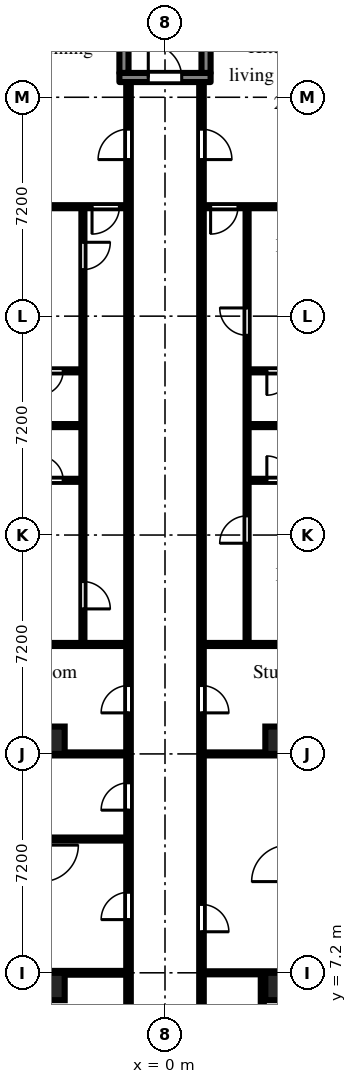
"""IFC4 building model, lengths in metres.
Left out: names, types, materials, properties, quantities, classifications, styles, units other than length and angle.
Written with IfcOpenShell. Run it as: python <this file> out.ifc"""

import sys

from ifc_helpers import new_model, si_unit, direction, frame, frame_2d, origin, origin_2d, place, context, subcontext, project, spatial, rectangle, extrude, element, fill, save


model = new_model("IFC4")
c1 = context("Model", 3, precision=1e-05, world=origin(), true_north=direction((0.0, 1.0)))
c2 = subcontext(c1, "Body", "Model", "MODEL_VIEW")
j1 = project(units=[si_unit("LENGTHUNIT", "METRE"), si_unit("PLANEANGLEUNIT", "RADIAN")], contexts=[c1])
p1 = place(None, origin())
s1 = spatial("IfcSite", under=j1, at=p1, CompositionType="ELEMENT")
p2 = place(p1, origin())
s2 = spatial("IfcBuilding", under=s1, at=p2, CompositionType="ELEMENT")
p3 = place(p2, frame((0.0, 0.0, 20.7)))
s3 = spatial("IfcBuildingStorey", under=s2, at=p3, CompositionType="ELEMENT", Elevation=20.7)
for number, where, z_axis, x_axis in (
    (1, (-3.75, 6.75, 0.0), (0.0, 0.0, 1.0), (1.0, 0.0, 0.0)),
    (2, (-3.75, 14.85, 0.0), (0.0, 0.0, 1.0), (1.0, 0.0, 0.0)),
    (3, (3.75, 6.75, 0.0), (0.0, 0.0, 1.0), (1.0, 0.0, 0.0)),
    (4, (3.75, 14.85, 0.0), (0.0, 0.0, 1.0), (1.0, 0.0, 0.0)),
):
    element("IfcColumn", number, at=place(p3, frame(where, z_axis=z_axis, x_axis=x_axis)), inside=s3, PredefinedType="COLUMN", context=c2, shape_type="SweptSolid", body=[
        extrude(rectangle(XDim=0.9, YDim=0.9, at=origin_2d()), origin(), (0.0, 0.0, 1.0), 3.0),
    ])
p4 = place(p3, frame((-1.5, 36.65, 0.0), z_axis=(0.0, 0.0, 1.0), x_axis=(1.0, 0.0, 0.0)))
e5 = element("IfcWall", 5, at=p4, inside=s3, PredefinedType="SHEAR", context=c2, shape_type="SweptSolid", body=[
    extrude(rectangle(XDim=3.0, YDim=0.3, at=frame_2d((1.5, 0.0))), origin(), (0.0, 0.0, 1.0), 2.575),
])
p5 = place(p4, frame((0.95, 0.0, 0.0)))
e6 = element("IfcOpeningElement", 6, at=p5, cuts=e5, PredefinedType="OPENING", context=c2, shape_type="SweptSolid", body=[
    extrude(rectangle(XDim=1.1, YDim=2.1, at=frame_2d((0.55, 1.05))), frame((0.0, 0.16, 0.0), z_axis=(0.0, -1.0, 0.0), x_axis=(1.0, 0.0, 0.0)), (0.0, 0.0, 1.0), 0.32),
])
for number, where, z_axis, x_axis in (
    (7, (-1.35, 36.8, 0.0), (0.0, 0.0, 1.0), (0.0, 1.0, 0.0)),
    (8, (1.35, 36.8, 0.0), (0.0, 0.0, 1.0), (0.0, 1.0, 0.0)),
):
    element("IfcWall", number, at=place(p3, frame(where, z_axis=z_axis, x_axis=x_axis)), inside=s3, PredefinedType="SHEAR", context=c2, shape_type="SweptSolid", body=[
        extrude(rectangle(XDim=5.8, YDim=0.3, at=frame_2d((2.9, 0.0))), origin(), (0.0, 0.0, 1.0), 2.575),
    ])
p6 = place(p3, frame((-6.9, 18.0, 0.0), z_axis=(0.0, 0.0, 1.0), x_axis=(1.0, 0.0, 0.0)))
e9 = element("IfcWall", 9, at=p6, inside=s3, PredefinedType="PARTITIONING", context=c2, shape_type="SweptSolid", body=[
    extrude(rectangle(XDim=5.625, YDim=0.1, at=frame_2d((2.812, 0.0))), origin(), (0.0, 0.0, 1.0), 2.575),
])
p7 = place(p3, frame((-6.9, 25.2, 0.0), z_axis=(0.0, 0.0, 1.0), x_axis=(1.0, 0.0, 0.0)))
e10 = element("IfcWall", 10, at=p7, inside=s3, PredefinedType="PARTITIONING", context=c2, shape_type="SweptSolid", body=[
    extrude(rectangle(XDim=4.15, YDim=0.1, at=frame_2d((2.075, 0.0))), origin(), (0.0, 0.0, 1.0), 2.575),
])
p8 = place(p3, frame((-6.9, 32.4, 0.0), z_axis=(0.0, 0.0, 1.0), x_axis=(1.0, 0.0, 0.0)))
e11 = element("IfcWall", 11, at=p8, inside=s3, PredefinedType="PARTITIONING", context=c2, shape_type="SweptSolid", body=[
    extrude(rectangle(XDim=5.625, YDim=0.1, at=frame_2d((2.812, 0.0))), origin(), (0.0, 0.0, 1.0), 2.575),
])
p9 = place(p8, frame((4.5, 0.0, 0.0)))
e12 = element("IfcOpeningElement", 12, at=p9, cuts=e11, PredefinedType="OPENING", context=c2, shape_type="SweptSolid", body=[
    extrude(rectangle(XDim=0.9, YDim=2.1, at=frame_2d((0.45, 1.05))), frame((0.0, 0.06, 0.0), z_axis=(0.0, -1.0, 0.0), x_axis=(1.0, 0.0, 0.0)), (0.0, 0.0, 1.0), 0.12),
])
p10 = place(p3, frame((-4.75, 23.4, 0.0), z_axis=(0.0, 0.0, 1.0), x_axis=(1.0, 0.0, 0.0)))
e13 = element("IfcWall", 13, at=p10, inside=s3, PredefinedType="PARTITIONING", context=c2, shape_type="SweptSolid", body=[
    extrude(rectangle(XDim=2.0, YDim=0.1, at=frame_2d((1.0, 0.0))), origin(), (0.0, 0.0, 1.0), 2.575),
])
p11 = place(p10, frame((0.6, 0.0, 0.0)))
e14 = element("IfcOpeningElement", 14, at=p11, cuts=e13, PredefinedType="OPENING", context=c2, shape_type="SweptSolid", body=[
    extrude(rectangle(XDim=0.8, YDim=2.1, at=frame_2d((0.4, 1.05))), frame((0.0, 0.06, 0.0), z_axis=(0.0, -1.0, 0.0), x_axis=(1.0, 0.0, 0.0)), (0.0, 0.0, 1.0), 0.12),
])
p12 = place(p3, frame((-4.75, 27.0, 0.0), z_axis=(0.0, 0.0, 1.0), x_axis=(1.0, 0.0, 0.0)))
e15 = element("IfcWall", 15, at=p12, inside=s3, PredefinedType="PARTITIONING", context=c2, shape_type="SweptSolid", body=[
    extrude(rectangle(XDim=2.0, YDim=0.1, at=frame_2d((1.0, 0.0))), origin(), (0.0, 0.0, 1.0), 2.575),
])
p13 = place(p12, frame((0.6, 0.0, 0.0)))
e16 = element("IfcOpeningElement", 16, at=p13, cuts=e15, PredefinedType="OPENING", context=c2, shape_type="SweptSolid", body=[
    extrude(rectangle(XDim=0.8, YDim=2.1, at=frame_2d((0.4, 1.05))), frame((0.0, 0.06, 0.0), z_axis=(0.0, -1.0, 0.0), x_axis=(1.0, 0.0, 0.0)), (0.0, 0.0, 1.0), 0.12),
])
p14 = place(p3, frame((-3.9, 7.2, 0.0), z_axis=(0.0, 0.0, 1.0), x_axis=(1.0, 0.0, 0.0)))
e17 = element("IfcWall", 17, at=p14, inside=s3, PredefinedType="PARTITIONING", context=c2, shape_type="SweptSolid", body=[
    extrude(rectangle(XDim=2.625, YDim=0.125, at=frame_2d((1.312, 0.0))), origin(), (0.0, 0.0, 1.0), 2.575),
])
for number, where, z_axis, x_axis in (
    (18, (-3.9, 11.6, 0.0), (0.0, 0.0, 1.0), (1.0, 0.0, 0.0)),
    (19, (-3.9, 14.4, 0.0), (0.0, 0.0, 1.0), (1.0, 0.0, 0.0)),
):
    element("IfcWall", number, at=place(p3, frame(where, z_axis=z_axis, x_axis=x_axis)), inside=s3, PredefinedType="PARTITIONING", context=c2, shape_type="SweptSolid", body=[
        extrude(rectangle(XDim=2.625, YDim=0.1, at=frame_2d((1.312, 0.0))), origin(), (0.0, 0.0, 1.0), 2.575),
    ])
p15 = place(p3, frame((-2.7, 18.05, 0.0), z_axis=(0.0, 0.0, 1.0), x_axis=(0.0, 1.0, 0.0)))
e20 = element("IfcWall", 20, at=p15, inside=s3, PredefinedType="PARTITIONING", context=c2, shape_type="SweptSolid", body=[
    extrude(rectangle(XDim=14.3, YDim=0.1, at=frame_2d((7.15, 0.0))), origin(), (0.0, 0.0, 1.0), 2.575),
])
p16 = place(p15, frame((1.12, 0.0, 0.0)))
e21 = element("IfcOpeningElement", 21, at=p16, cuts=e20, PredefinedType="OPENING", context=c2, shape_type="SweptSolid", body=[
    extrude(rectangle(XDim=0.9, YDim=2.1, at=frame_2d((0.45, 1.05))), frame((0.0, 0.06, 0.0), z_axis=(0.0, -1.0, 0.0), x_axis=(1.0, 0.0, 0.0)), (0.0, 0.0, 1.0), 0.12),
])
p17 = place(p15, frame((12.28, 0.0, 0.0)))
e22 = element("IfcOpeningElement", 22, at=p17, cuts=e20, PredefinedType="OPENING", context=c2, shape_type="SweptSolid", body=[
    extrude(rectangle(XDim=0.9, YDim=2.1, at=frame_2d((0.45, 1.05))), frame((0.0, 0.06, 0.0), z_axis=(0.0, -1.0, 0.0), x_axis=(1.0, 0.0, 0.0)), (0.0, 0.0, 1.0), 0.12),
])
p18 = place(p3, frame((-1.2, 1.275, 0.0), z_axis=(0.0, 0.0, 1.0), x_axis=(0.0, 1.0, 0.0)))
e23 = element("IfcWall", 23, at=p18, inside=s3, PredefinedType="PARTITIONING", context=c2, shape_type="SweptSolid", body=[
    extrude(rectangle(XDim=35.225, YDim=0.15, at=frame_2d((17.613, 0.0))), origin(), (0.0, 0.0, 1.0), 2.575),
])
p19 = place(p18, frame((0.675, 0.0, 0.0)))
e24 = element("IfcOpeningElement", 24, at=p19, cuts=e23, PredefinedType="OPENING", context=c2, shape_type="SweptSolid", body=[
    extrude(rectangle(XDim=0.9, YDim=2.1, at=frame_2d((0.45, 1.05))), frame((0.0, 0.085, 0.0), z_axis=(0.0, -1.0, 0.0), x_axis=(1.0, 0.0, 0.0)), (0.0, 0.0, 1.0), 0.17),
])
p20 = place(p18, frame((3.675, 0.0, 0.0)))
e25 = element("IfcOpeningElement", 25, at=p20, cuts=e23, PredefinedType="OPENING", context=c2, shape_type="SweptSolid", body=[
    extrude(rectangle(XDim=0.9, YDim=2.1, at=frame_2d((0.45, 1.05))), frame((0.0, 0.085, 0.0), z_axis=(0.0, -1.0, 0.0), x_axis=(1.0, 0.0, 0.0)), (0.0, 0.0, 1.0), 0.17),
])
p21 = place(p18, frame((11.275, 0.0, 0.0)))
e26 = element("IfcOpeningElement", 26, at=p21, cuts=e23, PredefinedType="OPENING", context=c2, shape_type="SweptSolid", body=[
    extrude(rectangle(XDim=0.9, YDim=2.1, at=frame_2d((0.45, 1.05))), frame((0.0, 0.085, 0.0), z_axis=(0.0, -1.0, 0.0), x_axis=(1.0, 0.0, 0.0)), (0.0, 0.0, 1.0), 0.17),
])
p22 = place(p18, frame((7.675, 0.0, 0.0)))
e27 = element("IfcOpeningElement", 27, at=p22, cuts=e23, PredefinedType="OPENING", context=c2, shape_type="SweptSolid", body=[
    extrude(rectangle(XDim=0.9, YDim=2.1, at=frame_2d((0.45, 1.05))), frame((0.0, 0.085, 0.0), z_axis=(0.0, -1.0, 0.0), x_axis=(1.0, 0.0, 0.0)), (0.0, 0.0, 1.0), 0.17),
])
p23 = place(p18, frame((14.475, 0.0, 0.0)))
e28 = element("IfcOpeningElement", 28, at=p23, cuts=e23, PredefinedType="OPENING", context=c2, shape_type="SweptSolid", body=[
    extrude(rectangle(XDim=0.9, YDim=2.1, at=frame_2d((0.45, 1.05))), frame((0.0, 0.085, 0.0), z_axis=(0.0, -1.0, 0.0), x_axis=(1.0, 0.0, 0.0)), (0.0, 0.0, 1.0), 0.17),
])
p24 = place(p18, frame((32.675, 0.0, 0.0)))
e29 = element("IfcOpeningElement", 29, at=p24, cuts=e23, PredefinedType="OPENING", context=c2, shape_type="SweptSolid", body=[
    extrude(rectangle(XDim=1.0, YDim=2.1, at=frame_2d((0.5, 1.05))), frame((0.0, 0.085, 0.0), z_axis=(0.0, -1.0, 0.0), x_axis=(1.0, 0.0, 0.0)), (0.0, 0.0, 1.0), 0.17),
])
p25 = place(p3, frame((1.2, 1.125, 0.0), z_axis=(0.0, 0.0, 1.0), x_axis=(0.0, 1.0, 0.0)))
e30 = element("IfcWall", 30, at=p25, inside=s3, PredefinedType="PARTITIONING", context=c2, shape_type="SweptSolid", body=[
    extrude(rectangle(XDim=35.375, YDim=0.15, at=frame_2d((17.688, 0.0))), origin(), (0.0, 0.0, 1.0), 2.575),
])
p26 = place(p25, frame((2.625, 0.0, 0.0)))
e31 = element("IfcOpeningElement", 31, at=p26, cuts=e30, PredefinedType="OPENING", context=c2, shape_type="SweptSolid", body=[
    extrude(rectangle(XDim=0.9, YDim=2.1, at=frame_2d((0.45, 1.05))), frame((0.0, 0.085, 0.0), z_axis=(0.0, -1.0, 0.0), x_axis=(1.0, 0.0, 0.0)), (0.0, 0.0, 1.0), 0.17),
])
p27 = place(p25, frame((7.425, 0.0, 0.0)))
e32 = element("IfcOpeningElement", 32, at=p27, cuts=e30, PredefinedType="OPENING", context=c2, shape_type="SweptSolid", body=[
    extrude(rectangle(XDim=0.9, YDim=2.1, at=frame_2d((0.45, 1.05))), frame((0.0, 0.085, 0.0), z_axis=(0.0, -1.0, 0.0), x_axis=(1.0, 0.0, 0.0)), (0.0, 0.0, 1.0), 0.17),
])
p28 = place(p25, frame((14.625, 0.0, 0.0)))
e33 = element("IfcOpeningElement", 33, at=p28, cuts=e30, PredefinedType="OPENING", context=c2, shape_type="SweptSolid", body=[
    extrude(rectangle(XDim=0.9, YDim=2.1, at=frame_2d((0.45, 1.05))), frame((0.0, 0.085, 0.0), z_axis=(0.0, -1.0, 0.0), x_axis=(1.0, 0.0, 0.0)), (0.0, 0.0, 1.0), 0.17),
])
p29 = place(p25, frame((32.825, 0.0, 0.0)))
e34 = element("IfcOpeningElement", 34, at=p29, cuts=e30, PredefinedType="OPENING", context=c2, shape_type="SweptSolid", body=[
    extrude(rectangle(XDim=1.0, YDim=2.1, at=frame_2d((0.5, 1.05))), frame((0.0, 0.085, 0.0), z_axis=(0.0, -1.0, 0.0), x_axis=(1.0, 0.0, 0.0)), (0.0, 0.0, 1.0), 0.17),
])
for number, where, z_axis, x_axis in (
    (35, (1.275, 7.2, 0.0), (0.0, 0.0, 1.0), (1.0, 0.0, 0.0)),
    (36, (1.275, 14.4, 0.0), (0.0, 0.0, 1.0), (1.0, 0.0, 0.0)),
):
    element("IfcWall", number, at=place(p3, frame(where, z_axis=z_axis, x_axis=x_axis)), inside=s3, PredefinedType="PARTITIONING", context=c2, shape_type="SweptSolid", body=[
        extrude(rectangle(XDim=2.625, YDim=0.1, at=frame_2d((1.312, 0.0))), origin(), (0.0, 0.0, 1.0), 2.575),
    ])
p30 = place(p3, frame((1.275, 18.0, 0.0), z_axis=(0.0, 0.0, 1.0), x_axis=(1.0, 0.0, 0.0)))
e37 = element("IfcWall", 37, at=p30, inside=s3, PredefinedType="PARTITIONING", context=c2, shape_type="SweptSolid", body=[
    extrude(rectangle(XDim=5.625, YDim=0.1, at=frame_2d((2.812, 0.0))), origin(), (0.0, 0.0, 1.0), 2.575),
])
p31 = place(p3, frame((1.275, 32.4, 0.0), z_axis=(0.0, 0.0, 1.0), x_axis=(1.0, 0.0, 0.0)))
e38 = element("IfcWall", 38, at=p31, inside=s3, PredefinedType="PARTITIONING", context=c2, shape_type="SweptSolid", body=[
    extrude(rectangle(XDim=5.625, YDim=0.1, at=frame_2d((2.812, 0.0))), origin(), (0.0, 0.0, 1.0), 2.575),
])
p32 = place(p31, frame((0.225, 0.0, 0.0)))
e39 = element("IfcOpeningElement", 39, at=p32, cuts=e38, PredefinedType="OPENING", context=c2, shape_type="SweptSolid", body=[
    extrude(rectangle(XDim=0.9, YDim=2.1, at=frame_2d((0.45, 1.05))), frame((0.0, 0.06, 0.0), z_axis=(0.0, -1.0, 0.0), x_axis=(1.0, 0.0, 0.0)), (0.0, 0.0, 1.0), 0.12),
])
p33 = place(p3, frame((2.7, 18.05, 0.0), z_axis=(0.0, 0.0, 1.0), x_axis=(0.0, 1.0, 0.0)))
e40 = element("IfcWall", 40, at=p33, inside=s3, PredefinedType="PARTITIONING", context=c2, shape_type="SweptSolid", body=[
    extrude(rectangle(XDim=14.3, YDim=0.1, at=frame_2d((7.15, 0.0))), origin(), (0.0, 0.0, 1.0), 2.575),
])
p34 = place(p33, frame((3.28, 0.0, 0.0)))
e41 = element("IfcOpeningElement", 41, at=p34, cuts=e40, PredefinedType="OPENING", context=c2, shape_type="SweptSolid", body=[
    extrude(rectangle(XDim=0.9, YDim=2.1, at=frame_2d((0.45, 1.05))), frame((0.0, 0.06, 0.0), z_axis=(0.0, -1.0, 0.0), x_axis=(1.0, 0.0, 0.0)), (0.0, 0.0, 1.0), 0.12),
])
p35 = place(p33, frame((10.12, 0.0, 0.0)))
e42 = element("IfcOpeningElement", 42, at=p35, cuts=e40, PredefinedType="OPENING", context=c2, shape_type="SweptSolid", body=[
    extrude(rectangle(XDim=0.9, YDim=2.1, at=frame_2d((0.45, 1.05))), frame((0.0, 0.06, 0.0), z_axis=(0.0, -1.0, 0.0), x_axis=(1.0, 0.0, 0.0)), (0.0, 0.0, 1.0), 0.12),
])
p36 = place(p3, frame((2.75, 23.4, 0.0), z_axis=(0.0, 0.0, 1.0), x_axis=(1.0, 0.0, 0.0)))
e43 = element("IfcWall", 43, at=p36, inside=s3, PredefinedType="PARTITIONING", context=c2, shape_type="SweptSolid", body=[
    extrude(rectangle(XDim=2.1, YDim=0.1, at=frame_2d((1.05, 0.0))), origin(), (0.0, 0.0, 1.0), 2.575),
])
p37 = place(p36, frame((0.6, 0.0, 0.0)))
e44 = element("IfcOpeningElement", 44, at=p37, cuts=e43, PredefinedType="OPENING", context=c2, shape_type="SweptSolid", body=[
    extrude(rectangle(XDim=0.8, YDim=2.1, at=frame_2d((0.4, 1.05))), frame((0.0, 0.06, 0.0), z_axis=(0.0, -1.0, 0.0), x_axis=(1.0, 0.0, 0.0)), (0.0, 0.0, 1.0), 0.12),
])
p38 = place(p3, frame((2.75, 25.2, 0.0), z_axis=(0.0, 0.0, 1.0), x_axis=(1.0, 0.0, 0.0)))
e45 = element("IfcWall", 45, at=p38, inside=s3, PredefinedType="PARTITIONING", context=c2, shape_type="SweptSolid", body=[
    extrude(rectangle(XDim=4.15, YDim=0.1, at=frame_2d((2.075, 0.0))), origin(), (0.0, 0.0, 1.0), 2.575),
])
p39 = place(p3, frame((2.75, 27.0, 0.0), z_axis=(0.0, 0.0, 1.0), x_axis=(1.0, 0.0, 0.0)))
e46 = element("IfcWall", 46, at=p39, inside=s3, PredefinedType="PARTITIONING", context=c2, shape_type="SweptSolid", body=[
    extrude(rectangle(XDim=2.1, YDim=0.1, at=frame_2d((1.05, 0.0))), origin(), (0.0, 0.0, 1.0), 2.575),
])
p40 = place(p39, frame((0.6, 0.0, 0.0)))
e47 = element("IfcOpeningElement", 47, at=p40, cuts=e46, PredefinedType="OPENING", context=c2, shape_type="SweptSolid", body=[
    extrude(rectangle(XDim=0.8, YDim=2.1, at=frame_2d((0.4, 1.05))), frame((0.0, 0.06, 0.0), z_axis=(0.0, -1.0, 0.0), x_axis=(1.0, 0.0, 0.0)), (0.0, 0.0, 1.0), 0.12),
])
p41 = place(p3, frame((3.2, 1.275, 0.0), z_axis=(0.0, 0.0, 1.0), x_axis=(0.0, 1.0, 0.0)))
e48 = element("IfcWall", 48, at=p41, inside=s3, PredefinedType="PARTITIONING", context=c2, shape_type="SweptSolid", body=[
    extrude(rectangle(XDim=5.875, YDim=0.1, at=frame_2d((2.938, 0.0))), origin(), (0.0, 0.0, 1.0), 2.575),
])
p42 = place(p5, origin())
e49 = element("IfcDoor", 49, at=p42, inside=s3, OperationType="SINGLE_SWING_LEFT", PredefinedType="DOOR", context=c2, shape_type="SweptSolid", body=[
    extrude(rectangle(XDim=1.1, YDim=2.1, at=frame_2d((0.55, 1.05))), frame((0.0, 0.025, 0.0), z_axis=(0.0, -1.0, 0.0), x_axis=(1.0, 0.0, 0.0)), (0.0, 0.0, 1.0), 0.05),
])
fill(e6, e49)
p43 = place(p21, origin())
e50 = element("IfcDoor", 50, at=p43, inside=s3, OperationType="SINGLE_SWING_LEFT", PredefinedType="DOOR", context=c2, shape_type="SweptSolid", body=[
    extrude(rectangle(XDim=0.9, YDim=2.1, at=frame_2d((0.45, 1.05))), frame((0.0, 0.025, 0.0), z_axis=(0.0, -1.0, 0.0), x_axis=(1.0, 0.0, 0.0)), (0.0, 0.0, 1.0), 0.05),
])
fill(e26, e50)
p44 = place(p22, origin())
e51 = element("IfcDoor", 51, at=p44, inside=s3, OperationType="SINGLE_SWING_LEFT", PredefinedType="DOOR", context=c2, shape_type="SweptSolid", body=[
    extrude(rectangle(XDim=0.9, YDim=2.1, at=frame_2d((0.45, 1.05))), frame((0.0, 0.025, 0.0), z_axis=(0.0, -1.0, 0.0), x_axis=(1.0, 0.0, 0.0)), (0.0, 0.0, 1.0), 0.05),
])
fill(e27, e51)
p45 = place(p23, origin())
e52 = element("IfcDoor", 52, at=p45, inside=s3, OperationType="SINGLE_SWING_LEFT", PredefinedType="DOOR", context=c2, shape_type="SweptSolid", body=[
    extrude(rectangle(XDim=0.9, YDim=2.1, at=frame_2d((0.45, 1.05))), frame((0.0, 0.025, 0.0), z_axis=(0.0, -1.0, 0.0), x_axis=(1.0, 0.0, 0.0)), (0.0, 0.0, 1.0), 0.05),
])
fill(e28, e52)
p46 = place(p24, origin())
e53 = element("IfcDoor", 53, at=p46, inside=s3, OperationType="SINGLE_SWING_LEFT", PredefinedType="DOOR", context=c2, shape_type="SweptSolid", body=[
    extrude(rectangle(XDim=1.0, YDim=2.1, at=frame_2d((0.5, 1.05))), frame((0.0, 0.025, 0.0), z_axis=(0.0, -1.0, 0.0), x_axis=(1.0, 0.0, 0.0)), (0.0, 0.0, 1.0), 0.05),
])
fill(e29, e53)
p47 = place(p16, frame((0.9, 0.0, 0.0), z_axis=(0.0, 0.0, 1.0), x_axis=(-1.0, 0.0, 0.0)))
e54 = element("IfcDoor", 54, at=p47, inside=s3, OperationType="SINGLE_SWING_RIGHT", PredefinedType="DOOR", context=c2, shape_type="SweptSolid", body=[
    extrude(rectangle(XDim=0.9, YDim=2.1, at=frame_2d((0.45, 1.05))), frame((0.0, 0.025, 0.0), z_axis=(0.0, -1.0, 0.0), x_axis=(1.0, 0.0, 0.0)), (0.0, 0.0, 1.0), 0.05),
])
fill(e21, e54)
p48 = place(p17, frame((0.9, 0.0, 0.0), z_axis=(0.0, 0.0, 1.0), x_axis=(-1.0, 0.0, 0.0)))
e55 = element("IfcDoor", 55, at=p48, inside=s3, OperationType="SINGLE_SWING_LEFT", PredefinedType="DOOR", context=c2, shape_type="SweptSolid", body=[
    extrude(rectangle(XDim=0.9, YDim=2.1, at=frame_2d((0.45, 1.05))), frame((0.0, 0.025, 0.0), z_axis=(0.0, -1.0, 0.0), x_axis=(1.0, 0.0, 0.0)), (0.0, 0.0, 1.0), 0.05),
])
fill(e22, e55)
p49 = place(p9, frame((0.9, 0.0, 0.0), z_axis=(0.0, 0.0, 1.0), x_axis=(-1.0, 0.0, 0.0)))
e56 = element("IfcDoor", 56, at=p49, inside=s3, OperationType="SINGLE_SWING_RIGHT", PredefinedType="DOOR", context=c2, shape_type="SweptSolid", body=[
    extrude(rectangle(XDim=0.9, YDim=2.1, at=frame_2d((0.45, 1.05))), frame((0.0, 0.025, 0.0), z_axis=(0.0, -1.0, 0.0), x_axis=(1.0, 0.0, 0.0)), (0.0, 0.0, 1.0), 0.05),
])
fill(e12, e56)
p50 = place(p11, origin())
e57 = element("IfcDoor", 57, at=p50, inside=s3, OperationType="SINGLE_SWING_LEFT", PredefinedType="DOOR", context=c2, shape_type="SweptSolid", body=[
    extrude(rectangle(XDim=0.8, YDim=2.1, at=frame_2d((0.4, 1.05))), frame((0.0, 0.025, 0.0), z_axis=(0.0, -1.0, 0.0), x_axis=(1.0, 0.0, 0.0)), (0.0, 0.0, 1.0), 0.05),
])
fill(e14, e57)
p51 = place(p13, frame((0.8, 0.0, 0.0), z_axis=(0.0, 0.0, 1.0), x_axis=(-1.0, 0.0, 0.0)))
e58 = element("IfcDoor", 58, at=p51, inside=s3, OperationType="SINGLE_SWING_RIGHT", PredefinedType="DOOR", context=c2, shape_type="SweptSolid", body=[
    extrude(rectangle(XDim=0.8, YDim=2.1, at=frame_2d((0.4, 1.05))), frame((0.0, 0.025, 0.0), z_axis=(0.0, -1.0, 0.0), x_axis=(1.0, 0.0, 0.0)), (0.0, 0.0, 1.0), 0.05),
])
fill(e16, e58)
p52 = place(p27, frame((0.9, 0.0, 0.0), z_axis=(0.0, 0.0, 1.0), x_axis=(-1.0, 0.0, 0.0)))
e59 = element("IfcDoor", 59, at=p52, inside=s3, OperationType="SINGLE_SWING_RIGHT", PredefinedType="DOOR", context=c2, shape_type="SweptSolid", body=[
    extrude(rectangle(XDim=0.9, YDim=2.1, at=frame_2d((0.45, 1.05))), frame((0.0, 0.025, 0.0), z_axis=(0.0, -1.0, 0.0), x_axis=(1.0, 0.0, 0.0)), (0.0, 0.0, 1.0), 0.05),
])
fill(e32, e59)
p53 = place(p28, frame((0.9, 0.0, 0.0), z_axis=(0.0, 0.0, 1.0), x_axis=(-1.0, 0.0, 0.0)))
e60 = element("IfcDoor", 60, at=p53, inside=s3, OperationType="SINGLE_SWING_RIGHT", PredefinedType="DOOR", context=c2, shape_type="SweptSolid", body=[
    extrude(rectangle(XDim=0.9, YDim=2.1, at=frame_2d((0.45, 1.05))), frame((0.0, 0.025, 0.0), z_axis=(0.0, -1.0, 0.0), x_axis=(1.0, 0.0, 0.0)), (0.0, 0.0, 1.0), 0.05),
])
fill(e33, e60)
p54 = place(p29, frame((1.0, 0.0, 0.0), z_axis=(0.0, 0.0, 1.0), x_axis=(-1.0, 0.0, 0.0)))
e61 = element("IfcDoor", 61, at=p54, inside=s3, OperationType="SINGLE_SWING_RIGHT", PredefinedType="DOOR", context=c2, shape_type="SweptSolid", body=[
    extrude(rectangle(XDim=1.0, YDim=2.1, at=frame_2d((0.5, 1.05))), frame((0.0, 0.025, 0.0), z_axis=(0.0, -1.0, 0.0), x_axis=(1.0, 0.0, 0.0)), (0.0, 0.0, 1.0), 0.05),
])
fill(e34, e61)
p55 = place(p32, frame((0.9, 0.0, 0.0), z_axis=(0.0, 0.0, 1.0), x_axis=(-1.0, 0.0, 0.0)))
e62 = element("IfcDoor", 62, at=p55, inside=s3, OperationType="SINGLE_SWING_RIGHT", PredefinedType="DOOR", context=c2, shape_type="SweptSolid", body=[
    extrude(rectangle(XDim=0.9, YDim=2.1, at=frame_2d((0.45, 1.05))), frame((0.0, 0.025, 0.0), z_axis=(0.0, -1.0, 0.0), x_axis=(1.0, 0.0, 0.0)), (0.0, 0.0, 1.0), 0.05),
])
fill(e39, e62)
p56 = place(p34, origin())
e63 = element("IfcDoor", 63, at=p56, inside=s3, OperationType="SINGLE_SWING_LEFT", PredefinedType="DOOR", context=c2, shape_type="SweptSolid", body=[
    extrude(rectangle(XDim=0.9, YDim=2.1, at=frame_2d((0.45, 1.05))), frame((0.0, 0.025, 0.0), z_axis=(0.0, -1.0, 0.0), x_axis=(1.0, 0.0, 0.0)), (0.0, 0.0, 1.0), 0.05),
])
fill(e41, e63)
p57 = place(p35, origin())
e64 = element("IfcDoor", 64, at=p57, inside=s3, OperationType="SINGLE_SWING_RIGHT", PredefinedType="DOOR", context=c2, shape_type="SweptSolid", body=[
    extrude(rectangle(XDim=0.9, YDim=2.1, at=frame_2d((0.45, 1.05))), frame((0.0, 0.025, 0.0), z_axis=(0.0, -1.0, 0.0), x_axis=(1.0, 0.0, 0.0)), (0.0, 0.0, 1.0), 0.05),
])
fill(e42, e64)
p58 = place(p37, origin())
e65 = element("IfcDoor", 65, at=p58, inside=s3, OperationType="SINGLE_SWING_LEFT", PredefinedType="DOOR", context=c2, shape_type="SweptSolid", body=[
    extrude(rectangle(XDim=0.8, YDim=2.1, at=frame_2d((0.4, 1.05))), frame((0.0, 0.025, 0.0), z_axis=(0.0, -1.0, 0.0), x_axis=(1.0, 0.0, 0.0)), (0.0, 0.0, 1.0), 0.05),
])
fill(e44, e65)
p59 = place(p40, frame((0.8, 0.0, 0.0), z_axis=(0.0, 0.0, 1.0), x_axis=(-1.0, 0.0, 0.0)))
e66 = element("IfcDoor", 66, at=p59, inside=s3, OperationType="SINGLE_SWING_RIGHT", PredefinedType="DOOR", context=c2, shape_type="SweptSolid", body=[
    extrude(rectangle(XDim=0.8, YDim=2.1, at=frame_2d((0.4, 1.05))), frame((0.0, 0.025, 0.0), z_axis=(0.0, -1.0, 0.0), x_axis=(1.0, 0.0, 0.0)), (0.0, 0.0, 1.0), 0.05),
])
fill(e47, e66)
save(model, sys.argv[1])
